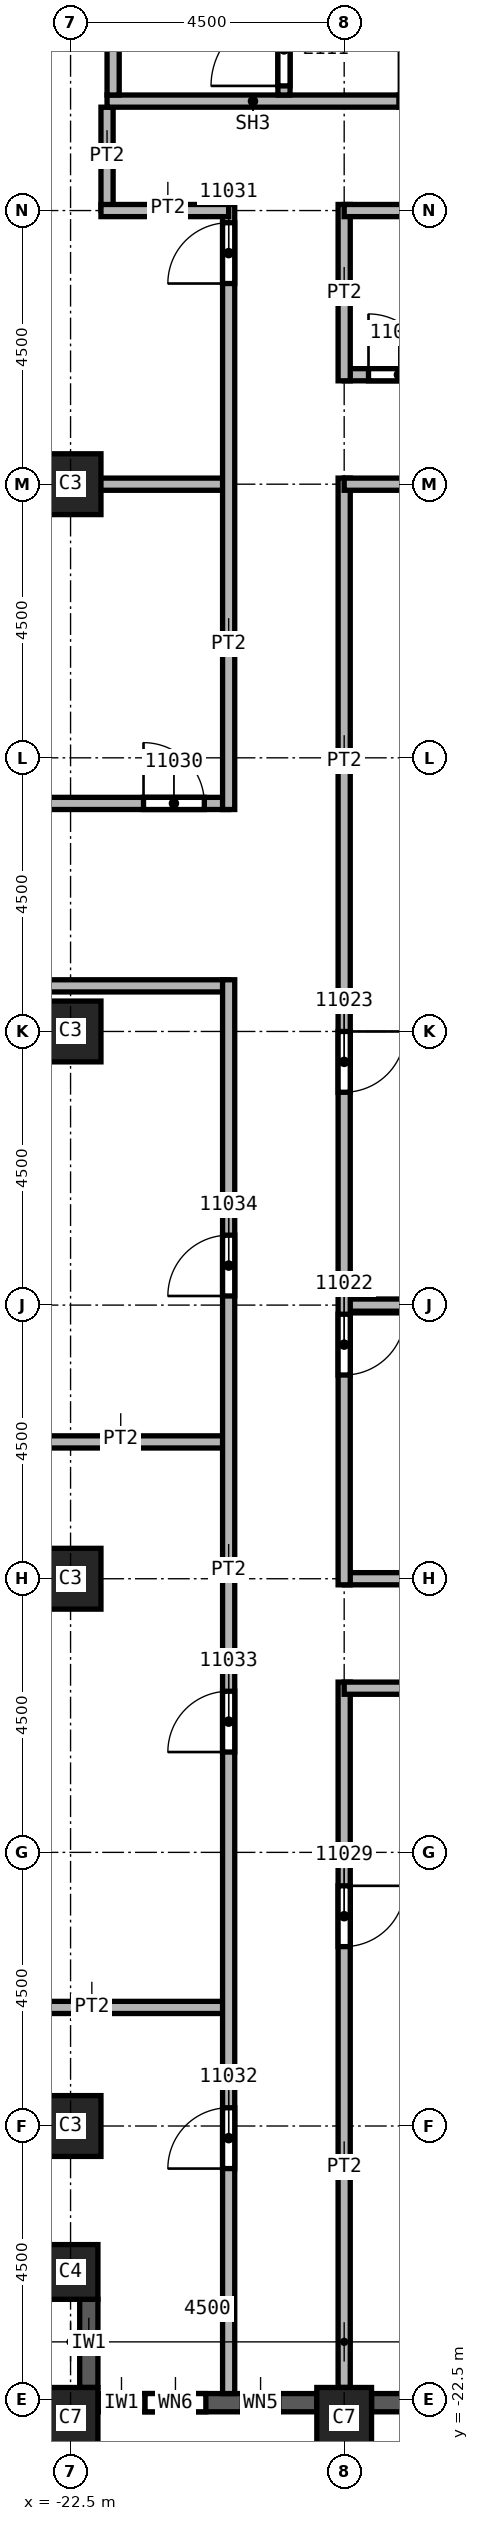
"""IFC4 building model, lengths in metres.
Left out: names, types, materials, properties, quantities, classifications, styles, units other than length and angle.
Written with IfcOpenShell. Run it as: python <this file> out.ifc"""

import sys

from ifc_helpers import new_model, si_unit, direction, frame, frame_2d, origin, origin_2d, place, context, subcontext, project, spatial, rectangle, extrude, element, fill, save


model = new_model("IFC4")
c1 = context("Model", 3, precision=1e-05, world=origin(), true_north=direction((0.0, 1.0)))
c2 = subcontext(c1, "Body", "Model", "MODEL_VIEW")
j1 = project(units=[si_unit("LENGTHUNIT", "METRE"), si_unit("PLANEANGLEUNIT", "RADIAN")], contexts=[c1])
p1 = place(None, origin())
s1 = spatial("IfcSite", under=j1, at=p1, CompositionType="ELEMENT")
p2 = place(p1, origin())
s2 = spatial("IfcBuilding", under=s1, at=p2, CompositionType="ELEMENT")
p3 = place(p2, frame((0.0, 0.0, 184.0)))
s3 = spatial("IfcBuildingStorey", under=s2, at=p3, CompositionType="ELEMENT", Elevation=184.0)
for number, where, z_axis, x_axis in (
    (1, (-22.5, 0.0, 0.0), (0.0, 0.0, 1.0), (1.0, 0.0, 0.0)),
    (2, (-22.5, 9.0, 0.0), (0.0, 0.0, 1.0), (1.0, 0.0, 0.0)),
    (3, (-22.5, -9.0, 0.0), (0.0, 0.0, 1.0), (1.0, 0.0, 0.0)),
    (4, (-22.5, -18.0, 0.0), (0.0, 0.0, 1.0), (1.0, 0.0, 0.0)),
):
    element("IfcColumn", number, at=place(p3, frame(where, z_axis=z_axis, x_axis=x_axis)), inside=s3, PredefinedType="COLUMN", context=c2, shape_type="SweptSolid", body=[
        extrude(rectangle(XDim=1.0, YDim=1.0, at=origin_2d()), origin(), (0.0, 0.0, 1.0), 3.72),
    ])
for number, where, z_axis, x_axis in (
    (5, (-18.0, -22.8, 0.0), (0.0, 0.0, 1.0), (1.0, 0.0, 0.0)),
    (6, (-22.5, -22.8, 0.0), (0.0, 0.0, 1.0), (1.0, 0.0, 0.0)),
):
    element("IfcColumn", number, at=place(p3, frame(where, z_axis=z_axis, x_axis=x_axis)), inside=s3, PredefinedType="COLUMN", context=c2, shape_type="SweptSolid", body=[
        extrude(rectangle(XDim=0.9, YDim=1.0, at=origin_2d()), origin(), (0.0, 0.0, 1.0), 3.72),
    ])
p4 = place(p3, frame((-22.5, -20.4, 0.0), z_axis=(0.0, 0.0, 1.0), x_axis=(1.0, 0.0, 0.0)))
e7 = element("IfcColumn", 7, at=p4, inside=s3, PredefinedType="COLUMN", context=c2, shape_type="SweptSolid", body=[
    extrude(rectangle(XDim=0.9, YDim=0.9, at=origin_2d()), origin(), (0.0, 0.0, 1.0), 3.72),
])
p5 = place(p3, frame((-22.2, -20.85, 0.0), z_axis=(0.0, 0.0, 1.0), x_axis=(0.0, -1.0, 0.0)))
e8 = element("IfcWall", 8, at=p5, inside=s3, PredefinedType="SOLIDWALL", context=c2, shape_type="SweptSolid", body=[
    extrude(rectangle(XDim=1.45, YDim=0.3, at=frame_2d((0.725, 0.0))), origin(), (0.0, 0.0, 1.0), 3.12),
])
p6 = place(p3, frame((-22.05, -22.55, 0.0), z_axis=(0.0, 0.0, 1.0), x_axis=(1.0, 0.0, 0.0)))
e9 = element("IfcWall", 9, at=p6, inside=s3, PredefinedType="SOLIDWALL", context=c2, shape_type="SweptSolid", body=[
    extrude(rectangle(XDim=3.6, YDim=0.3, at=frame_2d((1.8, 0.0))), origin(), (0.0, 0.0, 1.0), 3.12),
])
p7 = place(p6, frame((0.775, 0.0, 0.8)))
e10 = element("IfcOpeningElement", 10, at=p7, cuts=e9, PredefinedType="OPENING", context=c2, shape_type="SweptSolid", body=[
    extrude(rectangle(XDim=1.0, YDim=1.95, at=frame_2d((0.5, 0.975))), frame((0.0, 0.15, 0.0), z_axis=(0.0, -1.0, 0.0), x_axis=(1.0, 0.0, 0.0)), (0.0, 0.0, 1.0), 0.3),
])
p8 = place(p6, frame((2.375, 0.0, 0.8)))
e11 = element("IfcOpeningElement", 11, at=p8, cuts=e9, PredefinedType="OPENING", context=c2, shape_type="SweptSolid", body=[
    extrude(rectangle(XDim=0.6, YDim=1.95, at=frame_2d((0.3, 0.975))), frame((0.0, 0.15, 0.0), z_axis=(0.0, -1.0, 0.0), x_axis=(1.0, 0.0, 0.0)), (0.0, 0.0, 1.0), 0.3),
])
p9 = place(p3, frame((-17.55, -22.55, 0.0), z_axis=(0.0, 0.0, 1.0), x_axis=(1.0, 0.0, 0.0)))
e12 = element("IfcWall", 12, at=p9, inside=s3, PredefinedType="SOLIDWALL", context=c2, shape_type="SweptSolid", body=[
    extrude(rectangle(XDim=3.6, YDim=0.3, at=frame_2d((1.8, 0.0))), origin(), (0.0, 0.0, 1.0), 3.12),
])
p10 = place(p9, frame((0.6, 0.0, 0.8)))
e13 = element("IfcOpeningElement", 13, at=p10, cuts=e12, PredefinedType="OPENING", context=c2, shape_type="SweptSolid", body=[
    extrude(rectangle(XDim=2.4, YDim=1.95, at=frame_2d((1.2, 0.975))), frame((0.0, 0.15, 0.0), z_axis=(0.0, -1.0, 0.0), x_axis=(1.0, 0.0, 0.0)), (0.0, 0.0, 1.0), 0.3),
])
p11 = place(p3, frame((-33.85, 3.75, 0.0), z_axis=(0.0, 0.0, 1.0), x_axis=(1.0, 0.0, 0.0)))
e14 = element("IfcWall", 14, at=p11, inside=s3, PredefinedType="PARTITIONING", context=c2, shape_type="SweptSolid", body=[
    extrude(rectangle(XDim=13.95, YDim=0.2, at=frame_2d((6.975, 0.0))), origin(), (0.0, 0.0, 1.0), 3.72),
])
p12 = place(p11, frame((12.55, 0.0, 0.0)))
e15 = element("IfcOpeningElement", 15, at=p12, cuts=e14, PredefinedType="OPENING", context=c2, shape_type="SweptSolid", body=[
    extrude(rectangle(XDim=1.0, YDim=2.1, at=frame_2d((0.5, 1.05))), frame((0.0, 0.1, 0.0), z_axis=(0.0, -1.0, 0.0), x_axis=(1.0, 0.0, 0.0)), (0.0, 0.0, 1.0), 0.2),
])
p13 = place(p11, frame((3.25, 0.0, 0.0)))
e16 = element("IfcOpeningElement", 16, at=p13, cuts=e14, PredefinedType="OPENING", context=c2, shape_type="SweptSolid", body=[
    extrude(rectangle(XDim=1.0, YDim=2.1, at=frame_2d((0.5, 1.05))), frame((0.0, 0.1, 0.0), z_axis=(0.0, -1.0, 0.0), x_axis=(1.0, 0.0, 0.0)), (0.0, 0.0, 1.0), 0.2),
])
p14 = place(p3, frame((-27.1, 9.0, 0.0), z_axis=(0.0, 0.0, 1.0), x_axis=(1.0, 0.0, 0.0)))
e17 = element("IfcWall", 17, at=p14, inside=s3, PredefinedType="PARTITIONING", context=c2, shape_type="SweptSolid", body=[
    extrude(rectangle(XDim=7.2, YDim=0.2, at=frame_2d((3.6, 0.0))), origin(), (0.0, 0.0, 1.0), 3.72),
])
p15 = place(p3, frame((-19.9, 0.75, 0.0), z_axis=(0.0, 0.0, 1.0), x_axis=(-1.0, 0.0, 0.0)))
e18 = element("IfcWall", 18, at=p15, inside=s3, PredefinedType="PARTITIONING", context=c2, shape_type="SweptSolid", body=[
    extrude(rectangle(XDim=13.95, YDim=0.2, at=frame_2d((6.975, 0.0))), origin(), (0.0, 0.0, 1.0), 3.72),
])
p16 = place(p3, frame((-24.5, -16.05, 0.0), z_axis=(0.0, 0.0, 1.0), x_axis=(1.0, 0.0, 0.0)))
e19 = element("IfcWall", 19, at=p16, inside=s3, PredefinedType="PARTITIONING", context=c2, shape_type="SweptSolid", body=[
    extrude(rectangle(XDim=4.6, YDim=0.2, at=frame_2d((2.3, 0.0))), origin(), (0.0, 0.0, 1.0), 3.72),
])
p17 = place(p3, frame((-27.1, -6.75, 0.0), z_axis=(0.0, 0.0, 1.0), x_axis=(1.0, 0.0, 0.0)))
e20 = element("IfcWall", 20, at=p17, inside=s3, PredefinedType="PARTITIONING", context=c2, shape_type="SweptSolid", body=[
    extrude(rectangle(XDim=7.2, YDim=0.2, at=frame_2d((3.6, 0.0))), origin(), (0.0, 0.0, 1.0), 3.72),
])
p18 = place(p3, frame((-21.9, 13.5, 0.0), z_axis=(0.0, 0.0, 1.0), x_axis=(0.0, 1.0, 0.0)))
e21 = element("IfcWall", 21, at=p18, inside=s3, PredefinedType="PARTITIONING", context=c2, shape_type="SweptSolid", body=[
    extrude(rectangle(XDim=1.7, YDim=0.2, at=frame_2d((0.85, 0.0))), origin(), (0.0, 0.0, 1.0), 3.72),
])
p19 = place(p3, frame((-19.9, -22.4, 0.0), z_axis=(0.0, 0.0, 1.0), x_axis=(0.0, 1.0, 0.0)))
e22 = element("IfcWall", 22, at=p19, inside=s3, PredefinedType="PARTITIONING", context=c2, shape_type="SweptSolid", body=[
    extrude(rectangle(XDim=23.25, YDim=0.2, at=frame_2d((11.625, 0.0))), origin(), (0.0, 0.0, 1.0), 3.72),
])
p20 = place(p19, frame((3.7, 0.0, 0.0)))
e23 = element("IfcOpeningElement", 23, at=p20, cuts=e22, PredefinedType="OPENING", context=c2, shape_type="SweptSolid", body=[
    extrude(rectangle(XDim=1.0, YDim=2.1, at=frame_2d((0.5, 1.05))), frame((0.0, 0.1, 0.0), z_axis=(0.0, -1.0, 0.0), x_axis=(1.0, 0.0, 0.0)), (0.0, 0.0, 1.0), 0.2),
])
p21 = place(p19, frame((10.55, 0.0, 0.0)))
e24 = element("IfcOpeningElement", 24, at=p21, cuts=e22, PredefinedType="OPENING", context=c2, shape_type="SweptSolid", body=[
    extrude(rectangle(XDim=1.0, YDim=2.1, at=frame_2d((0.5, 1.05))), frame((0.0, 0.1, 0.0), z_axis=(0.0, -1.0, 0.0), x_axis=(1.0, 0.0, 0.0)), (0.0, 0.0, 1.0), 0.2),
])
p22 = place(p19, frame((18.05, 0.0, 0.0)))
e25 = element("IfcOpeningElement", 25, at=p22, cuts=e22, PredefinedType="OPENING", context=c2, shape_type="SweptSolid", body=[
    extrude(rectangle(XDim=1.0, YDim=2.1, at=frame_2d((0.5, 1.05))), frame((0.0, 0.1, 0.0), z_axis=(0.0, -1.0, 0.0), x_axis=(1.0, 0.0, 0.0)), (0.0, 0.0, 1.0), 0.2),
])
p23 = place(p3, frame((-19.9, 3.65, 0.0), z_axis=(0.0, 0.0, 1.0), x_axis=(0.0, 1.0, 0.0)))
e26 = element("IfcWall", 26, at=p23, inside=s3, PredefinedType="PARTITIONING", context=c2, shape_type="SweptSolid", body=[
    extrude(rectangle(XDim=9.95, YDim=0.2, at=frame_2d((4.975, 0.0))), origin(), (0.0, 0.0, 1.0), 3.72),
])
p24 = place(p23, frame((8.65, 0.0, 0.0)))
e27 = element("IfcOpeningElement", 27, at=p24, cuts=e26, PredefinedType="OPENING", context=c2, shape_type="SweptSolid", body=[
    extrude(rectangle(XDim=1.0, YDim=2.1, at=frame_2d((0.5, 1.05))), frame((0.0, 0.1, 0.0), z_axis=(0.0, -1.0, 0.0), x_axis=(1.0, 0.0, 0.0)), (0.0, 0.0, 1.0), 0.2),
])
p25 = place(p3, frame((-19.9, 13.5, 0.0), z_axis=(0.0, 0.0, 1.0), x_axis=(-1.0, 0.0, 0.0)))
e28 = element("IfcWall", 28, at=p25, inside=s3, PredefinedType="PARTITIONING", context=c2, shape_type="SweptSolid", body=[
    extrude(rectangle(XDim=2.1, YDim=0.2, at=frame_2d((1.05, 0.0))), origin(), (0.0, 0.0, 1.0), 3.72),
])
p26 = place(p3, frame((-18.0, -10.7, 0.0), z_axis=(0.0, 0.0, 1.0), x_axis=(0.0, -1.0, 0.0)))
e29 = element("IfcWall", 29, at=p26, inside=s3, PredefinedType="PARTITIONING", context=c2, shape_type="SweptSolid", body=[
    extrude(rectangle(XDim=11.6, YDim=0.2, at=frame_2d((5.8, 0.0))), origin(), (0.0, 0.0, 1.0), 3.72),
])
p27 = place(p26, frame((3.35, 0.0, 0.0)))
e30 = element("IfcOpeningElement", 30, at=p27, cuts=e29, PredefinedType="OPENING", context=c2, shape_type="SweptSolid", body=[
    extrude(rectangle(XDim=1.0, YDim=2.1, at=frame_2d((0.5, 1.05))), frame((0.0, 0.1, 0.0), z_axis=(0.0, -1.0, 0.0), x_axis=(1.0, 0.0, 0.0)), (0.0, 0.0, 1.0), 0.2),
])
for number, where, z_axis, x_axis in (
    (31, (-18.0, -9.0, 0.0), (0.0, 0.0, 1.0), (1.0, 0.0, 0.0)),
    (32, (-18.0, -4.5, 0.0), (0.0, 0.0, 1.0), (1.0, 0.0, 0.0)),
):
    element("IfcWall", number, at=place(p3, frame(where, z_axis=z_axis, x_axis=x_axis)), inside=s3, PredefinedType="PARTITIONING", context=c2, shape_type="SweptSolid", body=[
        extrude(rectangle(XDim=4.5, YDim=0.2, at=frame_2d((2.25, 0.0))), origin(), (0.0, 0.0, 1.0), 3.72),
    ])
p28 = place(p3, frame((-18.0, 9.1, 0.0), z_axis=(0.0, 0.0, 1.0), x_axis=(0.0, -1.0, 0.0)))
e33 = element("IfcWall", 33, at=p28, inside=s3, PredefinedType="PARTITIONING", context=c2, shape_type="SweptSolid", body=[
    extrude(rectangle(XDim=18.2, YDim=0.2, at=frame_2d((9.1, 0.0))), origin(), (0.0, 0.0, 1.0), 3.72),
])
p29 = place(p28, frame((13.75, 0.0, 0.0)))
e34 = element("IfcOpeningElement", 34, at=p29, cuts=e33, PredefinedType="OPENING", context=c2, shape_type="SweptSolid", body=[
    extrude(rectangle(XDim=1.0, YDim=2.1, at=frame_2d((0.5, 1.05))), frame((0.0, 0.1, 0.0), z_axis=(0.0, -1.0, 0.0), x_axis=(1.0, 0.0, 0.0)), (0.0, 0.0, 1.0), 0.2),
])
p30 = place(p28, frame((9.1, 0.0, 0.0)))
e35 = element("IfcOpeningElement", 35, at=p30, cuts=e33, PredefinedType="OPENING", context=c2, shape_type="SweptSolid", body=[
    extrude(rectangle(XDim=1.0, YDim=2.1, at=frame_2d((0.5, 1.05))), frame((0.0, 0.1, 0.0), z_axis=(0.0, -1.0, 0.0), x_axis=(1.0, 0.0, 0.0)), (0.0, 0.0, 1.0), 0.2),
])
p31 = place(p3, frame((-18.0, 10.8, 0.0), z_axis=(0.0, 0.0, 1.0), x_axis=(1.0, 0.0, 0.0)))
e36 = element("IfcWall", 36, at=p31, inside=s3, PredefinedType="PARTITIONING", context=c2, shape_type="SweptSolid", body=[
    extrude(rectangle(XDim=3.6, YDim=0.2, at=frame_2d((1.8, 0.0))), origin(), (0.0, 0.0, 1.0), 3.72),
])
p32 = place(p31, frame((0.4, 0.0, 0.0)))
e37 = element("IfcOpeningElement", 37, at=p32, cuts=e36, PredefinedType="OPENING", context=c2, shape_type="SweptSolid", body=[
    extrude(rectangle(XDim=1.0, YDim=2.1, at=frame_2d((0.5, 1.05))), frame((0.0, 0.1, 0.0), z_axis=(0.0, -1.0, 0.0), x_axis=(1.0, 0.0, 0.0)), (0.0, 0.0, 1.0), 0.2),
])
p33 = place(p3, frame((-18.0, 13.6, 0.0), z_axis=(0.0, 0.0, 1.0), x_axis=(0.0, -1.0, 0.0)))
e38 = element("IfcWall", 38, at=p33, inside=s3, PredefinedType="PARTITIONING", context=c2, shape_type="SweptSolid", body=[
    extrude(rectangle(XDim=2.9, YDim=0.2, at=frame_2d((1.45, 0.0))), origin(), (0.0, 0.0, 1.0), 3.72),
])
p34 = place(p3, frame((-15.3, 13.5, 0.0), z_axis=(0.0, 0.0, 1.0), x_axis=(-1.0, 0.0, 0.0)))
e39 = element("IfcWall", 39, at=p34, inside=s3, PredefinedType="PARTITIONING", context=c2, shape_type="SweptSolid", body=[
    extrude(rectangle(XDim=2.7, YDim=0.2, at=frame_2d((1.35, 0.0))), origin(), (0.0, 0.0, 1.0), 3.72),
])
p35 = place(p3, frame((-14.4, -10.8, 0.0), z_axis=(0.0, 0.0, 1.0), x_axis=(-1.0, 0.0, 0.0)))
e40 = element("IfcWall", 40, at=p35, inside=s3, PredefinedType="PARTITIONING", context=c2, shape_type="SweptSolid", body=[
    extrude(rectangle(XDim=3.6, YDim=0.2, at=frame_2d((1.8, 0.0))), origin(), (0.0, 0.0, 1.0), 3.72),
])
p36 = place(p3, frame((-13.5, 9.0, 0.0), z_axis=(0.0, 0.0, 1.0), x_axis=(-1.0, 0.0, 0.0)))
e41 = element("IfcWall", 41, at=p36, inside=s3, PredefinedType="PARTITIONING", context=c2, shape_type="SweptSolid", body=[
    extrude(rectangle(XDim=4.5, YDim=0.2, at=frame_2d((2.25, 0.0))), origin(), (0.0, 0.0, 1.0), 3.72),
])
p37 = place(p3, frame((-21.9, 15.3, 0.0), z_axis=(0.0, 0.0, 1.0), x_axis=(1.0, 0.0, 0.0)))
e42 = element("IfcWall", 42, at=p37, inside=s3, PredefinedType="SOLIDWALL", context=c2, shape_type="SweptSolid", body=[
    extrude(rectangle(XDim=8.275, YDim=0.2, at=frame_2d((4.137, 0.0))), origin(), (0.0, 0.0, 1.0), 3.72),
])
p38 = place(p37, frame((4.8, 0.0, 0.0)))
e43 = element("IfcOpeningElement", 43, at=p38, cuts=e42, PredefinedType="OPENING", context=c2, shape_type="SweptSolid", body=[
    extrude(rectangle(XDim=1.2, YDim=2.1, at=frame_2d((0.6, 1.05))), frame((0.0, 0.1, 0.0), z_axis=(0.0, -1.0, 0.0), x_axis=(1.0, 0.0, 0.0)), (0.0, 0.0, 1.0), 0.2),
])
p39 = place(p3, frame((-21.8, 15.4, 0.0), z_axis=(0.0, 0.0, 1.0), x_axis=(0.0, 1.0, 0.0)))
e44 = element("IfcWall", 44, at=p39, inside=s3, PredefinedType="SOLIDWALL", context=c2, shape_type="SweptSolid", body=[
    extrude(rectangle(XDim=5.9, YDim=0.2, at=frame_2d((2.95, 0.0))), origin(), (0.0, 0.0, 1.0), 3.72),
])
p40 = place(p3, frame((-18.99, 15.4, 0.0), z_axis=(0.0, 0.0, 1.0), x_axis=(0.0, 1.0, 0.0)))
e45 = element("IfcWall", 45, at=p40, inside=s3, PredefinedType="SOLIDWALL", context=c2, shape_type="SweptSolid", body=[
    extrude(rectangle(XDim=5.9, YDim=0.2, at=frame_2d((2.95, 0.0))), origin(), (0.0, 0.0, 1.0), 3.72),
])
p41 = place(p40, frame((0.15, 0.0, 0.0)))
e46 = element("IfcOpeningElement", 46, at=p41, cuts=e45, PredefinedType="OPENING", context=c2, shape_type="SweptSolid", body=[
    extrude(rectangle(XDim=1.2, YDim=2.1, at=frame_2d((0.6, 1.05))), frame((0.0, 0.1, 0.0), z_axis=(0.0, -1.0, 0.0), x_axis=(1.0, 0.0, 0.0)), (0.0, 0.0, 1.0), 0.2),
])
p42 = place(p29, origin())
e47 = element("IfcDoor", 47, at=p42, inside=s3, OperationType="SINGLE_SWING_LEFT", PredefinedType="DOOR", context=c2, shape_type="SweptSolid", body=[
    extrude(rectangle(XDim=1.0, YDim=2.1, at=frame_2d((0.5, 1.05))), frame((0.0, 0.025, 0.0), z_axis=(0.0, -1.0, 0.0), x_axis=(1.0, 0.0, 0.0)), (0.0, 0.0, 1.0), 0.05),
])
fill(e34, e47)
p43 = place(p30, origin())
e48 = element("IfcDoor", 48, at=p43, inside=s3, OperationType="SINGLE_SWING_RIGHT", PredefinedType="DOOR", context=c2, shape_type="SweptSolid", body=[
    extrude(rectangle(XDim=1.0, YDim=2.1, at=frame_2d((0.5, 1.05))), frame((0.0, 0.025, 0.0), z_axis=(0.0, -1.0, 0.0), x_axis=(1.0, 0.0, 0.0)), (0.0, 0.0, 1.0), 0.05),
])
fill(e35, e48)
p44 = place(p32, origin())
e49 = element("IfcDoor", 49, at=p44, inside=s3, OperationType="SINGLE_SWING_RIGHT", PredefinedType="DOOR", context=c2, shape_type="SweptSolid", body=[
    extrude(rectangle(XDim=1.0, YDim=2.1, at=frame_2d((0.5, 1.05))), frame((0.0, 0.025, 0.0), z_axis=(0.0, -1.0, 0.0), x_axis=(1.0, 0.0, 0.0)), (0.0, 0.0, 1.0), 0.05),
])
fill(e37, e49)
p45 = place(p27, origin())
e50 = element("IfcDoor", 50, at=p45, inside=s3, OperationType="SINGLE_SWING_RIGHT", PredefinedType="DOOR", context=c2, shape_type="SweptSolid", body=[
    extrude(rectangle(XDim=1.0, YDim=2.1, at=frame_2d((0.5, 1.05))), frame((0.0, 0.025, 0.0), z_axis=(0.0, -1.0, 0.0), x_axis=(1.0, 0.0, 0.0)), (0.0, 0.0, 1.0), 0.05),
])
fill(e30, e50)
p46 = place(p12, origin())
e51 = element("IfcDoor", 51, at=p46, inside=s3, OperationType="SINGLE_SWING_LEFT", PredefinedType="DOOR", context=c2, shape_type="SweptSolid", body=[
    extrude(rectangle(XDim=1.0, YDim=2.1, at=frame_2d((0.5, 1.05))), frame((0.0, 0.025, 0.0), z_axis=(0.0, -1.0, 0.0), x_axis=(1.0, 0.0, 0.0)), (0.0, 0.0, 1.0), 0.05),
])
fill(e15, e51)
p47 = place(p24, origin())
e52 = element("IfcDoor", 52, at=p47, inside=s3, OperationType="SINGLE_SWING_RIGHT", PredefinedType="DOOR", context=c2, shape_type="SweptSolid", body=[
    extrude(rectangle(XDim=1.0, YDim=2.1, at=frame_2d((0.5, 1.05))), frame((0.0, 0.025, 0.0), z_axis=(0.0, -1.0, 0.0), x_axis=(1.0, 0.0, 0.0)), (0.0, 0.0, 1.0), 0.05),
])
fill(e27, e52)
p48 = place(p20, origin())
e53 = element("IfcDoor", 53, at=p48, inside=s3, OperationType="SINGLE_SWING_LEFT", PredefinedType="DOOR", context=c2, shape_type="SweptSolid", body=[
    extrude(rectangle(XDim=1.0, YDim=2.1, at=frame_2d((0.5, 1.05))), frame((0.0, 0.025, 0.0), z_axis=(0.0, -1.0, 0.0), x_axis=(1.0, 0.0, 0.0)), (0.0, 0.0, 1.0), 0.05),
])
fill(e23, e53)
p49 = place(p21, origin())
e54 = element("IfcDoor", 54, at=p49, inside=s3, OperationType="SINGLE_SWING_RIGHT", PredefinedType="DOOR", context=c2, shape_type="SweptSolid", body=[
    extrude(rectangle(XDim=1.0, YDim=2.1, at=frame_2d((0.5, 1.05))), frame((0.0, 0.025, 0.0), z_axis=(0.0, -1.0, 0.0), x_axis=(1.0, 0.0, 0.0)), (0.0, 0.0, 1.0), 0.05),
])
fill(e24, e54)
p50 = place(p22, origin())
e55 = element("IfcDoor", 55, at=p50, inside=s3, OperationType="SINGLE_SWING_LEFT", PredefinedType="DOOR", context=c2, shape_type="SweptSolid", body=[
    extrude(rectangle(XDim=1.0, YDim=2.1, at=frame_2d((0.5, 1.05))), frame((0.0, 0.025, 0.0), z_axis=(0.0, -1.0, 0.0), x_axis=(1.0, 0.0, 0.0)), (0.0, 0.0, 1.0), 0.05),
])
fill(e25, e55)
p51 = place(p41, origin())
e56 = element("IfcDoor", 56, at=p51, inside=s3, OperationType="SINGLE_SWING_LEFT", PredefinedType="DOOR", context=c2, shape_type="SweptSolid", body=[
    extrude(rectangle(XDim=1.2, YDim=2.1, at=frame_2d((0.6, 1.05))), frame((0.0, 0.025, 0.0), z_axis=(0.0, -1.0, 0.0), x_axis=(1.0, 0.0, 0.0)), (0.0, 0.0, 1.0), 0.05),
])
fill(e46, e56)
p52 = place(p7, origin())
e57 = element("IfcWindow", 57, at=p52, inside=s3, PartitioningType="SINGLE_PANEL", PredefinedType="WINDOW", context=c2, shape_type="SweptSolid", body=[
    extrude(rectangle(XDim=1.0, YDim=1.95, at=frame_2d((0.5, 0.975))), frame((0.0, 0.03, 0.0), z_axis=(0.0, -1.0, 0.0), x_axis=(1.0, 0.0, 0.0)), (0.0, 0.0, 1.0), 0.06),
])
fill(e10, e57)
p53 = place(p8, origin())
e58 = element("IfcWindow", 58, at=p53, inside=s3, PartitioningType="SINGLE_PANEL", PredefinedType="WINDOW", context=c2, shape_type="SweptSolid", body=[
    extrude(rectangle(XDim=0.6, YDim=1.95, at=frame_2d((0.3, 0.975))), frame((0.0, 0.03, 0.0), z_axis=(0.0, -1.0, 0.0), x_axis=(1.0, 0.0, 0.0)), (0.0, 0.0, 1.0), 0.06),
])
fill(e11, e58)
save(model, sys.argv[1])
